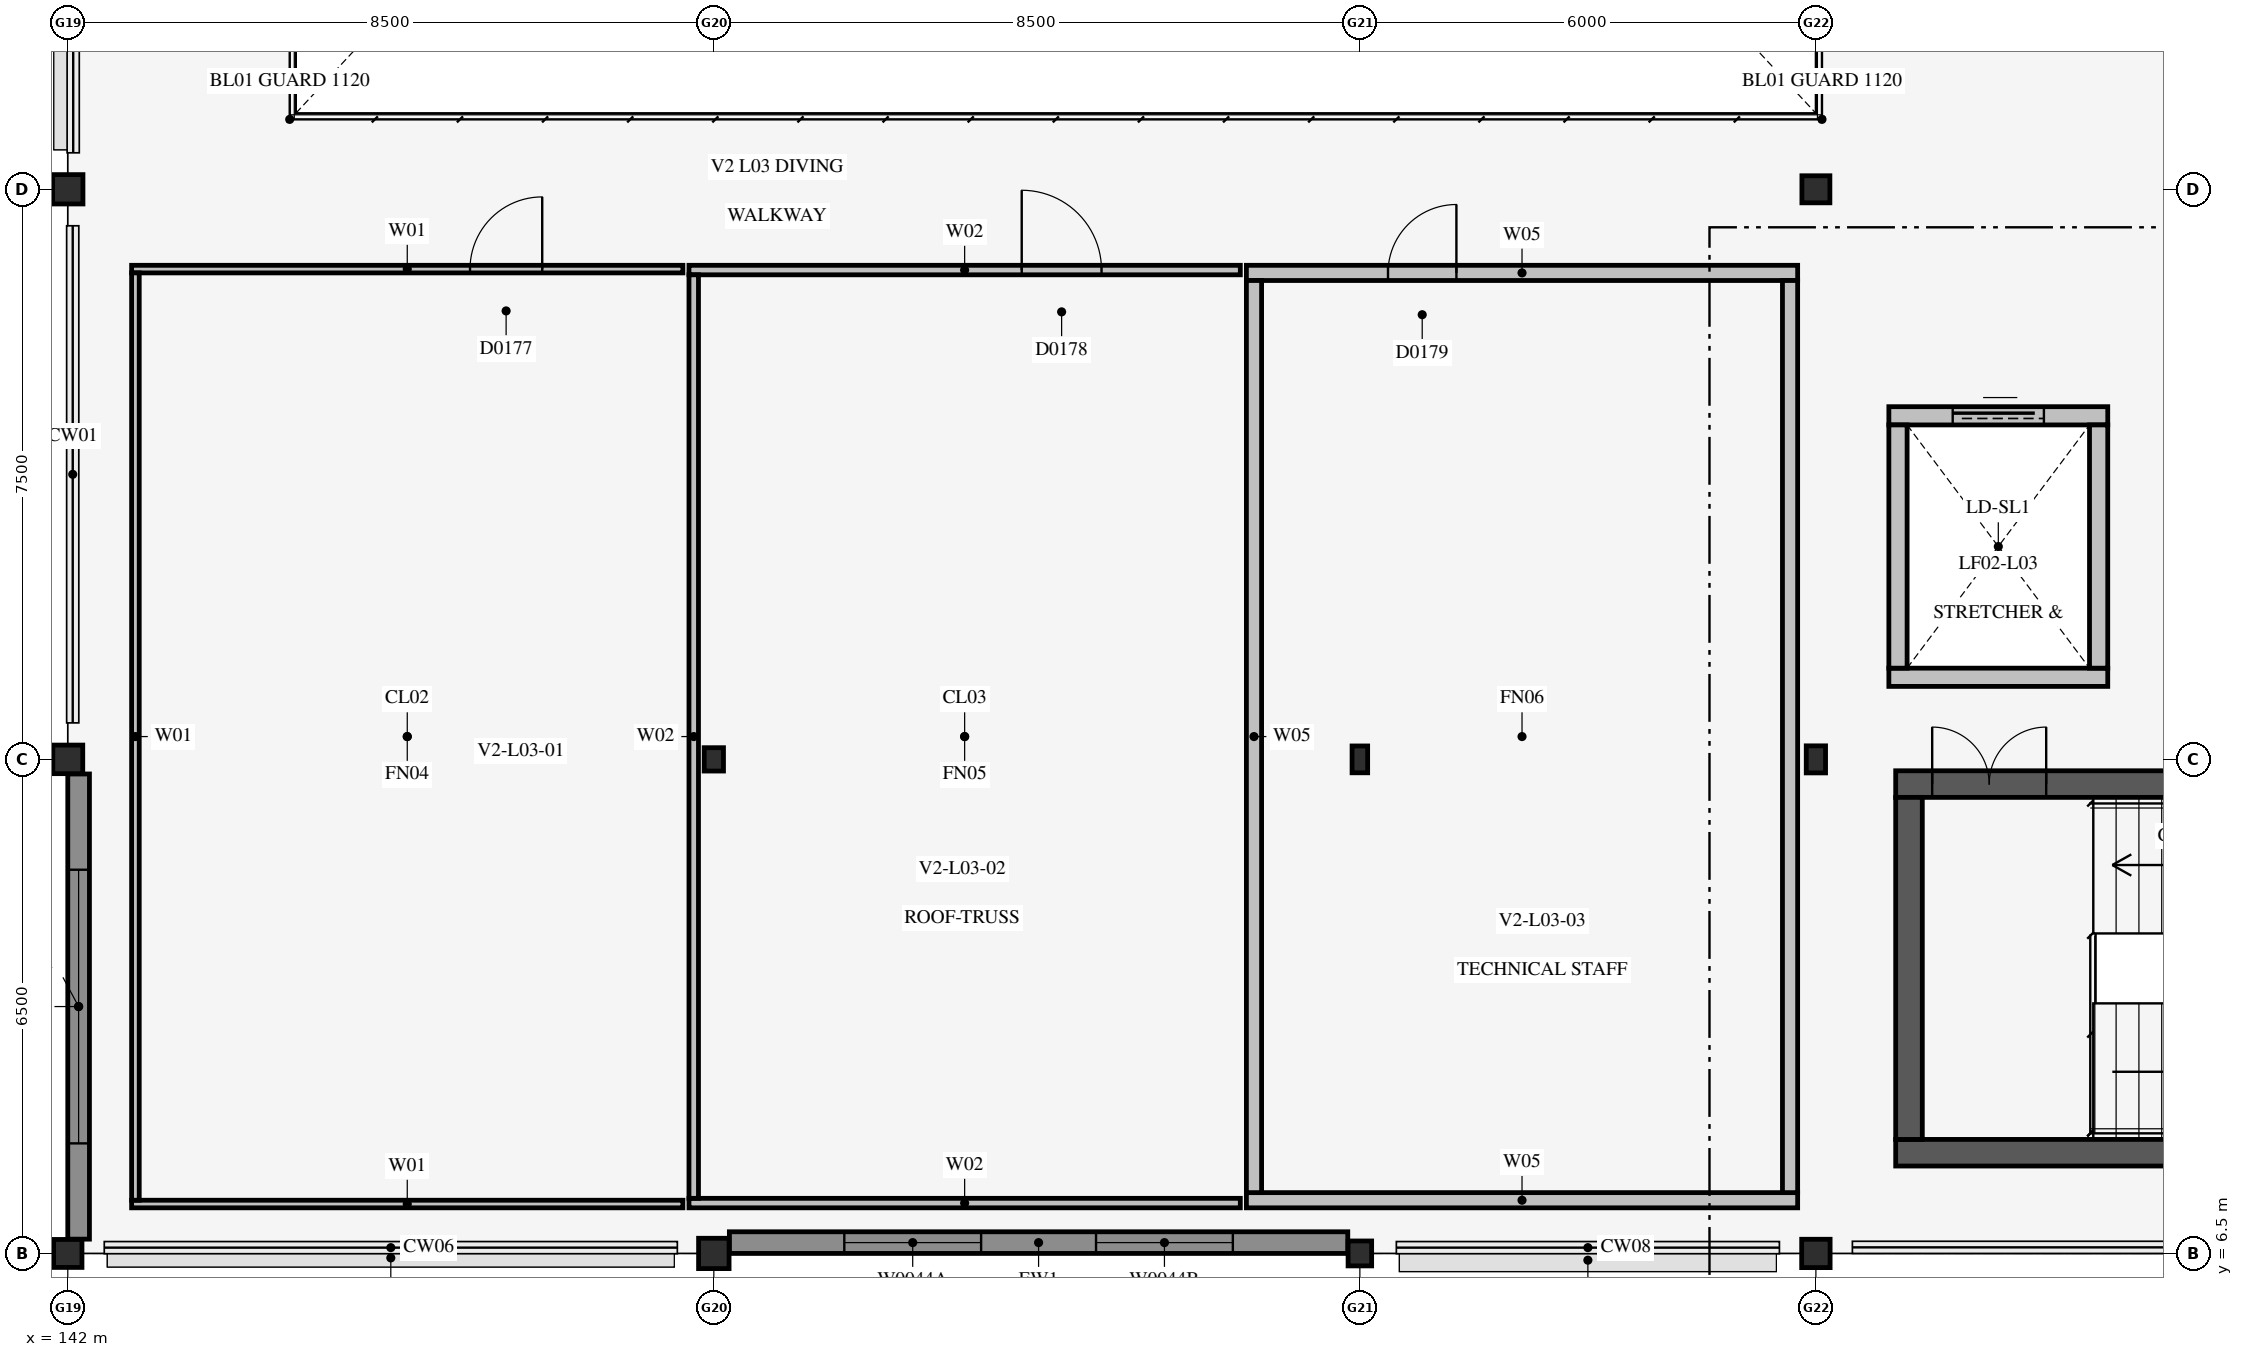
"""IFC4 building model, lengths in metres.
Left out: names, types, materials, properties, quantities, classifications, styles, units other than length and angle.
Written with IfcOpenShell. Run it as: python <this file> out.ifc"""

import sys

from ifc_helpers import new_model, si_unit, direction, frame, frame_2d, origin, origin_2d, place, context, subcontext, project, spatial, rectangle, i_section, extrude, element, fill, save


model = new_model("IFC4")
c1 = context("Model", 3, precision=1e-05, world=origin(), true_north=direction((0.0, 1.0)))
c2 = subcontext(c1, "Body", "Model", "MODEL_VIEW")
j1 = project(units=[si_unit("LENGTHUNIT", "METRE"), si_unit("PLANEANGLEUNIT", "RADIAN")], contexts=[c1])
p1 = place(None, origin())
s1 = spatial("IfcSite", under=j1, at=p1, CompositionType="ELEMENT")
p2 = place(p1, origin())
s2 = spatial("IfcBuilding", under=s1, at=p2, CompositionType="ELEMENT")
p3 = place(p2, frame((0.0, 0.0, 14.8)))
s3 = spatial("IfcBuildingStorey", under=s2, at=p3, CompositionType="ELEMENT", Elevation=14.8)
p4 = place(p3, frame((166.05, 7.825, 0.0), z_axis=(0.0, 0.0, 1.0), x_axis=(1.0, 0.0, 0.0)))
e1 = element("IfcWall", 1, at=p4, inside=s3, PredefinedType="SHEAR", context=c2, shape_type="SweptSolid", body=[
    extrude(rectangle(XDim=9.5, YDim=0.35, at=frame_2d((4.75, 0.0))), origin(), (0.0, 0.0, 1.0), 4.0),
])
p5 = place(p3, frame((166.05, 12.675, 0.0), z_axis=(0.0, 0.0, 1.0), x_axis=(1.0, 0.0, 0.0)))
e2 = element("IfcWall", 2, at=p5, inside=s3, PredefinedType="SHEAR", context=c2, shape_type="SweptSolid", body=[
    extrude(rectangle(XDim=9.5, YDim=0.35, at=frame_2d((4.75, 0.0))), origin(), (0.0, 0.0, 1.0), 4.0),
])
p6 = place(p5, frame((0.48, 0.0, 0.0)))
e3 = element("IfcOpeningElement", 3, at=p6, cuts=e2, PredefinedType="OPENING", context=c2, shape_type="SweptSolid", body=[
    extrude(rectangle(XDim=1.5, YDim=2.3, at=frame_2d((0.75, 1.15))), frame((0.0, 0.187, 0.0), z_axis=(0.0, -1.0, 0.0), x_axis=(1.0, 0.0, 0.0)), (0.0, 0.0, 1.0), 0.374),
])
p7 = place(p3, frame((166.225, 8.0, 0.0), z_axis=(0.0, 0.0, 1.0), x_axis=(0.0, 1.0, 0.0)))
e4 = element("IfcWall", 4, at=p7, inside=s3, PredefinedType="SHEAR", context=c2, shape_type="SweptSolid", body=[
    extrude(rectangle(XDim=4.5, YDim=0.35, at=frame_2d((2.25, 0.0))), origin(), (0.0, 0.0, 1.0), 4.0),
])
p8 = place(p3, frame((165.96, 14.08, 0.0), z_axis=(0.0, 0.0, 1.0), x_axis=(1.0, 0.0, 0.0)))
e5 = element("IfcWall", 5, at=p8, inside=s3, PredefinedType="SOLIDWALL", context=c2, shape_type="SweptSolid", body=[
    extrude(rectangle(XDim=2.88, YDim=0.24, at=frame_2d((1.44, 0.0))), origin(), (0.0, 0.0, 1.0), 3.45),
])
p9 = place(p3, frame((165.96, 17.52, 0.0), z_axis=(0.0, 0.0, 1.0), x_axis=(1.0, 0.0, 0.0)))
e6 = element("IfcWall", 6, at=p9, inside=s3, PredefinedType="SOLIDWALL", context=c2, shape_type="SweptSolid", body=[
    extrude(rectangle(XDim=2.88, YDim=0.24, at=frame_2d((1.44, 0.0))), origin(), (0.0, 0.0, 1.0), 3.45),
])
p10 = place(p9, frame((0.84, 0.0, 0.0)))
e7 = element("IfcOpeningElement", 7, at=p10, cuts=e6, PredefinedType="OPENING", context=c2, shape_type="SweptSolid", body=[
    extrude(rectangle(XDim=1.2, YDim=2.2, at=frame_2d((0.6, 1.1))), frame((0.0, 0.132, 0.0), z_axis=(0.0, -1.0, 0.0), x_axis=(1.0, 0.0, 0.0)), (0.0, 0.0, 1.0), 0.264),
])
for number, where, z_axis, x_axis in (
    (8, (166.08, 14.2, 0.0), (0.0, 0.0, 1.0), (0.0, 1.0, 0.0)),
    (9, (168.72, 14.2, 0.0), (0.0, 0.0, 1.0), (0.0, 1.0, 0.0)),
):
    element("IfcWall", number, at=place(p3, frame(where, z_axis=z_axis, x_axis=x_axis)), inside=s3, PredefinedType="SOLIDWALL", context=c2, shape_type="SweptSolid", body=[
        extrude(rectangle(XDim=3.2, YDim=0.24, at=frame_2d((1.6, 0.0))), origin(), (0.0, 0.0, 1.0), 3.45),
    ])
p11 = place(p3, frame((142.0, 6.5, 0.0), z_axis=(0.0, 0.0, 1.0), x_axis=(1.0, 0.0, 0.0)))
e10 = element("IfcColumn", 10, at=p11, inside=s3, PredefinedType="COLUMN", context=c2, shape_type="SweptSolid", body=[
    extrude(i_section(OverallWidth=0.373, OverallDepth=0.368, WebThickness=0.015, FlangeThickness=0.024, FilletRadius=0.014, at=origin_2d()), origin(), (0.0, 0.0, 1.0), 4.82),
])
p12 = place(p3, frame((142.0, 13.0, 0.0), z_axis=(0.0, 0.0, 1.0), x_axis=(1.0, 0.0, 0.0)))
e11 = element("IfcColumn", 11, at=p12, inside=s3, PredefinedType="COLUMN", context=c2, shape_type="SweptSolid", body=[
    extrude(i_section(OverallWidth=0.394, OverallDepth=0.376, WebThickness=0.017, FlangeThickness=0.028, FilletRadius=0.014, at=origin_2d()), origin(), (0.0, 0.0, 1.0), 4.82),
])
p13 = place(p3, frame((142.0, 20.5, 0.0), z_axis=(0.0, 0.0, 1.0), x_axis=(1.0, 0.0, 0.0)))
e12 = element("IfcColumn", 12, at=p13, inside=s3, PredefinedType="COLUMN", context=c2, shape_type="SweptSolid", body=[
    extrude(i_section(OverallWidth=0.399, OverallDepth=0.386, WebThickness=0.021, FlangeThickness=0.033, FilletRadius=0.014, at=origin_2d()), origin(), (0.0, 0.0, 1.0), 4.82),
])
p14 = place(p3, frame((150.5, 6.5, 0.0), z_axis=(0.0, 0.0, 1.0), x_axis=(1.0, 0.0, 0.0)))
e13 = element("IfcColumn", 13, at=p14, inside=s3, PredefinedType="COLUMN", context=c2, shape_type="SweptSolid", body=[
    extrude(i_section(OverallWidth=0.401, OverallDepth=0.399, WebThickness=0.025, FlangeThickness=0.04, FilletRadius=0.014, at=origin_2d()), origin(), (0.0, 0.0, 1.0), 4.82),
])
p15 = place(p3, frame((150.5, 13.0, 0.0), z_axis=(0.0, 0.0, 1.0), x_axis=(1.0, 0.0, 0.0)))
e14 = element("IfcColumn", 14, at=p15, inside=s3, PredefinedType="COLUMN", context=c2, shape_type="SweptSolid", body=[
    extrude(i_section(OverallWidth=0.254, OverallDepth=0.307, WebThickness=0.009, FlangeThickness=0.015, FilletRadius=0.014, at=origin_2d()), origin(), (0.0, 0.0, 1.0), 4.82),
])
p16 = place(p3, frame((159.0, 6.5, 0.0), z_axis=(0.0, 0.0, 1.0), x_axis=(1.0, 0.0, 0.0)))
e15 = element("IfcColumn", 15, at=p16, inside=s3, PredefinedType="COLUMN", context=c2, shape_type="SweptSolid", body=[
    extrude(i_section(OverallWidth=0.31, OverallDepth=0.328, WebThickness=0.015, FlangeThickness=0.025, FilletRadius=0.014, at=origin_2d()), origin(), (0.0, 0.0, 1.0), 4.82),
])
p17 = place(p3, frame((159.0, 13.0, 0.0), z_axis=(0.0, 0.0, 1.0), x_axis=(1.0, 0.0, 0.0)))
e16 = element("IfcColumn", 16, at=p17, inside=s3, PredefinedType="COLUMN", context=c2, shape_type="SweptSolid", body=[
    extrude(i_section(OverallWidth=0.205, OverallDepth=0.353, WebThickness=0.009, FlangeThickness=0.017, FilletRadius=0.014, at=origin_2d()), origin(), (0.0, 0.0, 1.0), 4.82),
])
p18 = place(p3, frame((165.0, 6.5, 0.0), z_axis=(0.0, 0.0, 1.0), x_axis=(1.0, 0.0, 0.0)))
e17 = element("IfcColumn", 17, at=p18, inside=s3, PredefinedType="COLUMN", context=c2, shape_type="SweptSolid", body=[
    extrude(i_section(OverallWidth=0.374, OverallDepth=0.373, WebThickness=0.016, FlangeThickness=0.026, FilletRadius=0.014, at=origin_2d()), origin(), (0.0, 0.0, 1.0), 4.82),
])
p19 = place(p3, frame((165.0, 13.0, 0.0), z_axis=(0.0, 0.0, 1.0), x_axis=(1.0, 0.0, 0.0)))
e18 = element("IfcColumn", 18, at=p19, inside=s3, PredefinedType="COLUMN", context=c2, shape_type="SweptSolid", body=[
    extrude(i_section(OverallWidth=0.254, OverallDepth=0.356, WebThickness=0.011, FlangeThickness=0.018, FilletRadius=0.014, at=origin_2d()), origin(), (0.0, 0.0, 1.0), 4.82),
])
p20 = place(p3, frame((165.0, 20.5, 0.0), z_axis=(0.0, 0.0, 1.0), x_axis=(1.0, 0.0, 0.0)))
e19 = element("IfcColumn", 19, at=p20, inside=s3, PredefinedType="COLUMN", context=c2, shape_type="SweptSolid", body=[
    extrude(i_section(OverallWidth=0.368, OverallDepth=0.356, WebThickness=0.011, FlangeThickness=0.018, FilletRadius=0.014, at=origin_2d()), origin(), (0.0, 0.0, 1.0), 4.82),
])
p21 = place(p3, frame((142.84, 7.15, 0.0), z_axis=(0.0, 0.0, 1.0), x_axis=(1.0, 0.0, 0.0)))
e20 = element("IfcWall", 20, at=p21, inside=s3, PredefinedType="PARTITIONING", context=c2, shape_type="SweptSolid", body=[
    extrude(rectangle(XDim=7.253, YDim=0.1, at=frame_2d((3.626, 0.0))), origin(), (0.0, 0.0, 1.0), 3.785),
])
p22 = place(p3, frame((142.84, 19.45, 0.0), z_axis=(0.0, 0.0, 1.0), x_axis=(1.0, 0.0, 0.0)))
e21 = element("IfcWall", 21, at=p22, inside=s3, PredefinedType="PARTITIONING", context=c2, shape_type="SweptSolid", body=[
    extrude(rectangle(XDim=7.253, YDim=0.1, at=frame_2d((3.626, 0.0))), origin(), (0.0, 0.0, 1.0), 3.785),
])
p23 = place(p22, frame((4.452, 0.0, 0.0)))
e22 = element("IfcOpeningElement", 22, at=p23, cuts=e21, PredefinedType="OPENING", context=c2, shape_type="SweptSolid", body=[
    extrude(rectangle(XDim=0.95, YDim=2.15, at=frame_2d((0.475, 1.075))), frame((0.0, 0.062, 0.0), z_axis=(0.0, -1.0, 0.0), x_axis=(1.0, 0.0, 0.0)), (0.0, 0.0, 1.0), 0.124),
])
p24 = place(p3, frame((142.89, 7.2, 0.0), z_axis=(0.0, 0.0, 1.0), x_axis=(0.0, 1.0, 0.0)))
e23 = element("IfcWall", 23, at=p24, inside=s3, PredefinedType="PARTITIONING", context=c2, shape_type="SweptSolid", body=[
    extrude(rectangle(XDim=12.2, YDim=0.1, at=frame_2d((6.1, 0.0))), origin(), (0.0, 0.0, 1.0), 3.785),
])
p25 = place(p3, frame((150.173, 7.163, 0.0), z_axis=(0.0, 0.0, 1.0), x_axis=(1.0, 0.0, 0.0)))
e24 = element("IfcWall", 24, at=p25, inside=s3, PredefinedType="PARTITIONING", context=c2, shape_type="SweptSolid", body=[
    extrude(rectangle(XDim=7.254, YDim=0.125, at=frame_2d((3.627, 0.0))), origin(), (0.0, 0.0, 1.0), 3.785),
])
p26 = place(p3, frame((150.173, 19.438, 0.0), z_axis=(0.0, 0.0, 1.0), x_axis=(1.0, 0.0, 0.0)))
e25 = element("IfcWall", 25, at=p26, inside=s3, PredefinedType="PARTITIONING", context=c2, shape_type="SweptSolid", body=[
    extrude(rectangle(XDim=7.254, YDim=0.125, at=frame_2d((3.627, 0.0))), origin(), (0.0, 0.0, 1.0), 3.785),
])
p27 = place(p26, frame((4.378, 0.0, 0.0)))
e26 = element("IfcOpeningElement", 26, at=p27, cuts=e25, PredefinedType="OPENING", context=c2, shape_type="SweptSolid", body=[
    extrude(rectangle(XDim=1.05, YDim=2.15, at=frame_2d((0.525, 1.075))), frame((0.0, 0.074, 0.0), z_axis=(0.0, -1.0, 0.0), x_axis=(1.0, 0.0, 0.0)), (0.0, 0.0, 1.0), 0.149),
])
p28 = place(p3, frame((150.236, 7.225, 0.0), z_axis=(0.0, 0.0, 1.0), x_axis=(0.0, 1.0, 0.0)))
e27 = element("IfcWall", 27, at=p28, inside=s3, PredefinedType="PARTITIONING", context=c2, shape_type="SweptSolid", body=[
    extrude(rectangle(XDim=12.15, YDim=0.125, at=frame_2d((6.075, 0.0))), origin(), (0.0, 0.0, 1.0), 3.785),
])
p29 = place(p3, frame((157.507, 7.2, 0.0), z_axis=(0.0, 0.0, 1.0), x_axis=(1.0, 0.0, 0.0)))
e28 = element("IfcWall", 28, at=p29, inside=s3, PredefinedType="PLUMBINGWALL", context=c2, shape_type="SweptSolid", body=[
    extrude(rectangle(XDim=7.253, YDim=0.2, at=frame_2d((3.626, 0.0))), origin(), (0.0, 0.0, 1.0), 3.785),
])
p30 = place(p3, frame((157.507, 19.4, 0.0), z_axis=(0.0, 0.0, 1.0), x_axis=(1.0, 0.0, 0.0)))
e29 = element("IfcWall", 29, at=p30, inside=s3, PredefinedType="PLUMBINGWALL", context=c2, shape_type="SweptSolid", body=[
    extrude(rectangle(XDim=7.253, YDim=0.2, at=frame_2d((3.626, 0.0))), origin(), (0.0, 0.0, 1.0), 3.785),
])
p31 = place(p30, frame((1.863, 0.0, 0.0)))
e30 = element("IfcOpeningElement", 30, at=p31, cuts=e29, PredefinedType="OPENING", context=c2, shape_type="SweptSolid", body=[
    extrude(rectangle(XDim=0.9, YDim=2.1, at=frame_2d((0.45, 1.05))), frame((0.0, 0.112, 0.0), z_axis=(0.0, -1.0, 0.0), x_axis=(1.0, 0.0, 0.0)), (0.0, 0.0, 1.0), 0.224),
])
for number, where, z_axis, x_axis in (
    (31, (164.66, 7.3, 0.0), (0.0, 0.0, 1.0), (0.0, 1.0, 0.0)),
    (32, (157.607, 7.3, 0.0), (0.0, 0.0, 1.0), (0.0, 1.0, 0.0)),
):
    element("IfcWall", number, at=place(p3, frame(where, z_axis=z_axis, x_axis=x_axis)), inside=s3, PredefinedType="PLUMBINGWALL", context=c2, shape_type="SweptSolid", body=[
        extrude(rectangle(XDim=12.0, YDim=0.2, at=frame_2d((6.0, 0.0))), origin(), (0.0, 0.0, 1.0), 3.785),
    ])
p32 = place(p3, frame((150.705, 6.643, 0.0), z_axis=(0.0, 0.0, 1.0), x_axis=(1.0, 0.0, 0.0)))
e33 = element("IfcWall", 33, at=p32, inside=s3, PredefinedType="SOLIDWALL", context=c2, shape_type="SweptSolid", body=[
    extrude(rectangle(XDim=8.136, YDim=0.285, at=frame_2d((4.068, 0.0))), origin(), (0.0, 0.0, 1.0), 3.684),
])
p33 = place(p32, frame((1.512, 0.0, 0.95)))
e34 = element("IfcOpeningElement", 34, at=p33, cuts=e33, PredefinedType="OPENING", context=c2, shape_type="SweptSolid", body=[
    extrude(rectangle(XDim=1.8, YDim=1.8, at=frame_2d((0.9, 0.9))), frame((0.0, 0.154, 0.0), z_axis=(0.0, -1.0, 0.0), x_axis=(1.0, 0.0, 0.0)), (0.0, 0.0, 1.0), 0.309),
])
p34 = place(p32, frame((4.824, 0.0, 0.95)))
e35 = element("IfcOpeningElement", 35, at=p34, cuts=e33, PredefinedType="OPENING", context=c2, shape_type="SweptSolid", body=[
    extrude(rectangle(XDim=1.8, YDim=1.8, at=frame_2d((0.9, 0.9))), frame((0.0, 0.154, 0.0), z_axis=(0.0, -1.0, 0.0), x_axis=(1.0, 0.0, 0.0)), (0.0, 0.0, 1.0), 0.309),
])
p35 = place(p3, frame((142.143, 6.688, 0.0), z_axis=(0.0, 0.0, 1.0), x_axis=(0.0, 1.0, 0.0)))
e36 = element("IfcWall", 36, at=p35, inside=s3, PredefinedType="SOLIDWALL", context=c2, shape_type="SweptSolid", body=[
    extrude(rectangle(XDim=6.12, YDim=0.285, at=frame_2d((3.06, 0.0))), origin(), (0.0, 0.0, 1.0), 4.05),
])
p36 = place(p35, frame((1.26, 0.0, 0.95)))
e37 = element("IfcOpeningElement", 37, at=p36, cuts=e36, PredefinedType="OPENING", context=c2, shape_type="SweptSolid", body=[
    extrude(rectangle(XDim=3.6, YDim=1.8, at=frame_2d((1.8, 0.9))), frame((0.0, 0.154, 0.0), z_axis=(0.0, -1.0, 0.0), x_axis=(1.0, 0.0, 0.0)), (0.0, 0.0, 1.0), 0.309),
])
p37 = place(p6, frame((1.5, 0.0, 0.0), z_axis=(0.0, 0.0, 1.0), x_axis=(-1.0, 0.0, 0.0)))
e38 = element("IfcDoor", 38, at=p37, inside=s3, OperationType="DOUBLE_DOOR_SINGLE_SWING", PredefinedType="DOOR", context=c2, shape_type="SweptSolid", body=[
    extrude(rectangle(XDim=1.5, YDim=2.3, at=frame_2d((0.75, 1.15))), frame((0.0, 0.025, 0.0), z_axis=(0.0, -1.0, 0.0), x_axis=(1.0, 0.0, 0.0)), (0.0, 0.0, 1.0), 0.05),
])
fill(e3, e38)
p38 = place(p23, frame((0.95, 0.0, 0.0), z_axis=(0.0, 0.0, 1.0), x_axis=(-1.0, 0.0, 0.0)))
e39 = element("IfcDoor", 39, at=p38, inside=s3, OperationType="SINGLE_SWING_RIGHT", PredefinedType="DOOR", context=c2, shape_type="SweptSolid", body=[
    extrude(rectangle(XDim=0.95, YDim=2.15, at=frame_2d((0.475, 1.075))), frame((0.0, 0.025, 0.0), z_axis=(0.0, -1.0, 0.0), x_axis=(1.0, 0.0, 0.0)), (0.0, 0.0, 1.0), 0.05),
])
fill(e22, e39)
p39 = place(p27, frame((1.05, 0.0, 0.0), z_axis=(0.0, 0.0, 1.0), x_axis=(-1.0, 0.0, 0.0)))
e40 = element("IfcDoor", 40, at=p39, inside=s3, OperationType="SINGLE_SWING_LEFT", PredefinedType="DOOR", context=c2, shape_type="SweptSolid", body=[
    extrude(rectangle(XDim=1.05, YDim=2.15, at=frame_2d((0.525, 1.075))), frame((0.0, 0.025, 0.0), z_axis=(0.0, -1.0, 0.0), x_axis=(1.0, 0.0, 0.0)), (0.0, 0.0, 1.0), 0.05),
])
fill(e26, e40)
p40 = place(p31, frame((0.9, 0.0, 0.0), z_axis=(0.0, 0.0, 1.0), x_axis=(-1.0, 0.0, 0.0)))
e41 = element("IfcDoor", 41, at=p40, inside=s3, OperationType="SINGLE_SWING_RIGHT", PredefinedType="DOOR", context=c2, shape_type="SweptSolid", body=[
    extrude(rectangle(XDim=0.9, YDim=2.1, at=frame_2d((0.45, 1.05))), frame((0.0, 0.025, 0.0), z_axis=(0.0, -1.0, 0.0), x_axis=(1.0, 0.0, 0.0)), (0.0, 0.0, 1.0), 0.05),
])
fill(e30, e41)
p41 = place(p33, origin())
e42 = element("IfcWindow", 42, at=p41, inside=s3, PartitioningType="SINGLE_PANEL", PredefinedType="WINDOW", context=c2, shape_type="SweptSolid", body=[
    extrude(rectangle(XDim=1.8, YDim=1.8, at=frame_2d((0.9, 0.9))), frame((0.0, 0.03, 0.0), z_axis=(0.0, -1.0, 0.0), x_axis=(1.0, 0.0, 0.0)), (0.0, 0.0, 1.0), 0.06),
])
fill(e34, e42)
p42 = place(p34, origin())
e43 = element("IfcWindow", 43, at=p42, inside=s3, PartitioningType="SINGLE_PANEL", PredefinedType="WINDOW", context=c2, shape_type="SweptSolid", body=[
    extrude(rectangle(XDim=1.8, YDim=1.8, at=frame_2d((0.9, 0.9))), frame((0.0, 0.03, 0.0), z_axis=(0.0, -1.0, 0.0), x_axis=(1.0, 0.0, 0.0)), (0.0, 0.0, 1.0), 0.06),
])
fill(e35, e43)
p43 = place(p36, origin())
e44 = element("IfcWindow", 44, at=p43, inside=s3, PartitioningType="SINGLE_PANEL", PredefinedType="WINDOW", context=c2, shape_type="SweptSolid", body=[
    extrude(rectangle(XDim=3.6, YDim=1.8, at=frame_2d((1.8, 0.9))), frame((0.0, 0.03, 0.0), z_axis=(0.0, -1.0, 0.0), x_axis=(1.0, 0.0, 0.0)), (0.0, 0.0, 1.0), 0.06),
])
fill(e37, e44)
p44 = place(p10, origin())
e45 = element("IfcDoor", 45, at=p44, inside=s3, OperationType="SLIDING_TO_LEFT", PredefinedType="USERDEFINED", context=c2, shape_type="SweptSolid", body=[
    extrude(rectangle(XDim=1.2, YDim=2.2, at=frame_2d((0.6, 1.1))), frame((0.0, 0.025, 0.0), z_axis=(0.0, -1.0, 0.0), x_axis=(1.0, 0.0, 0.0)), (0.0, 0.0, 1.0), 0.05),
])
fill(e7, e45)
save(model, sys.argv[1])
